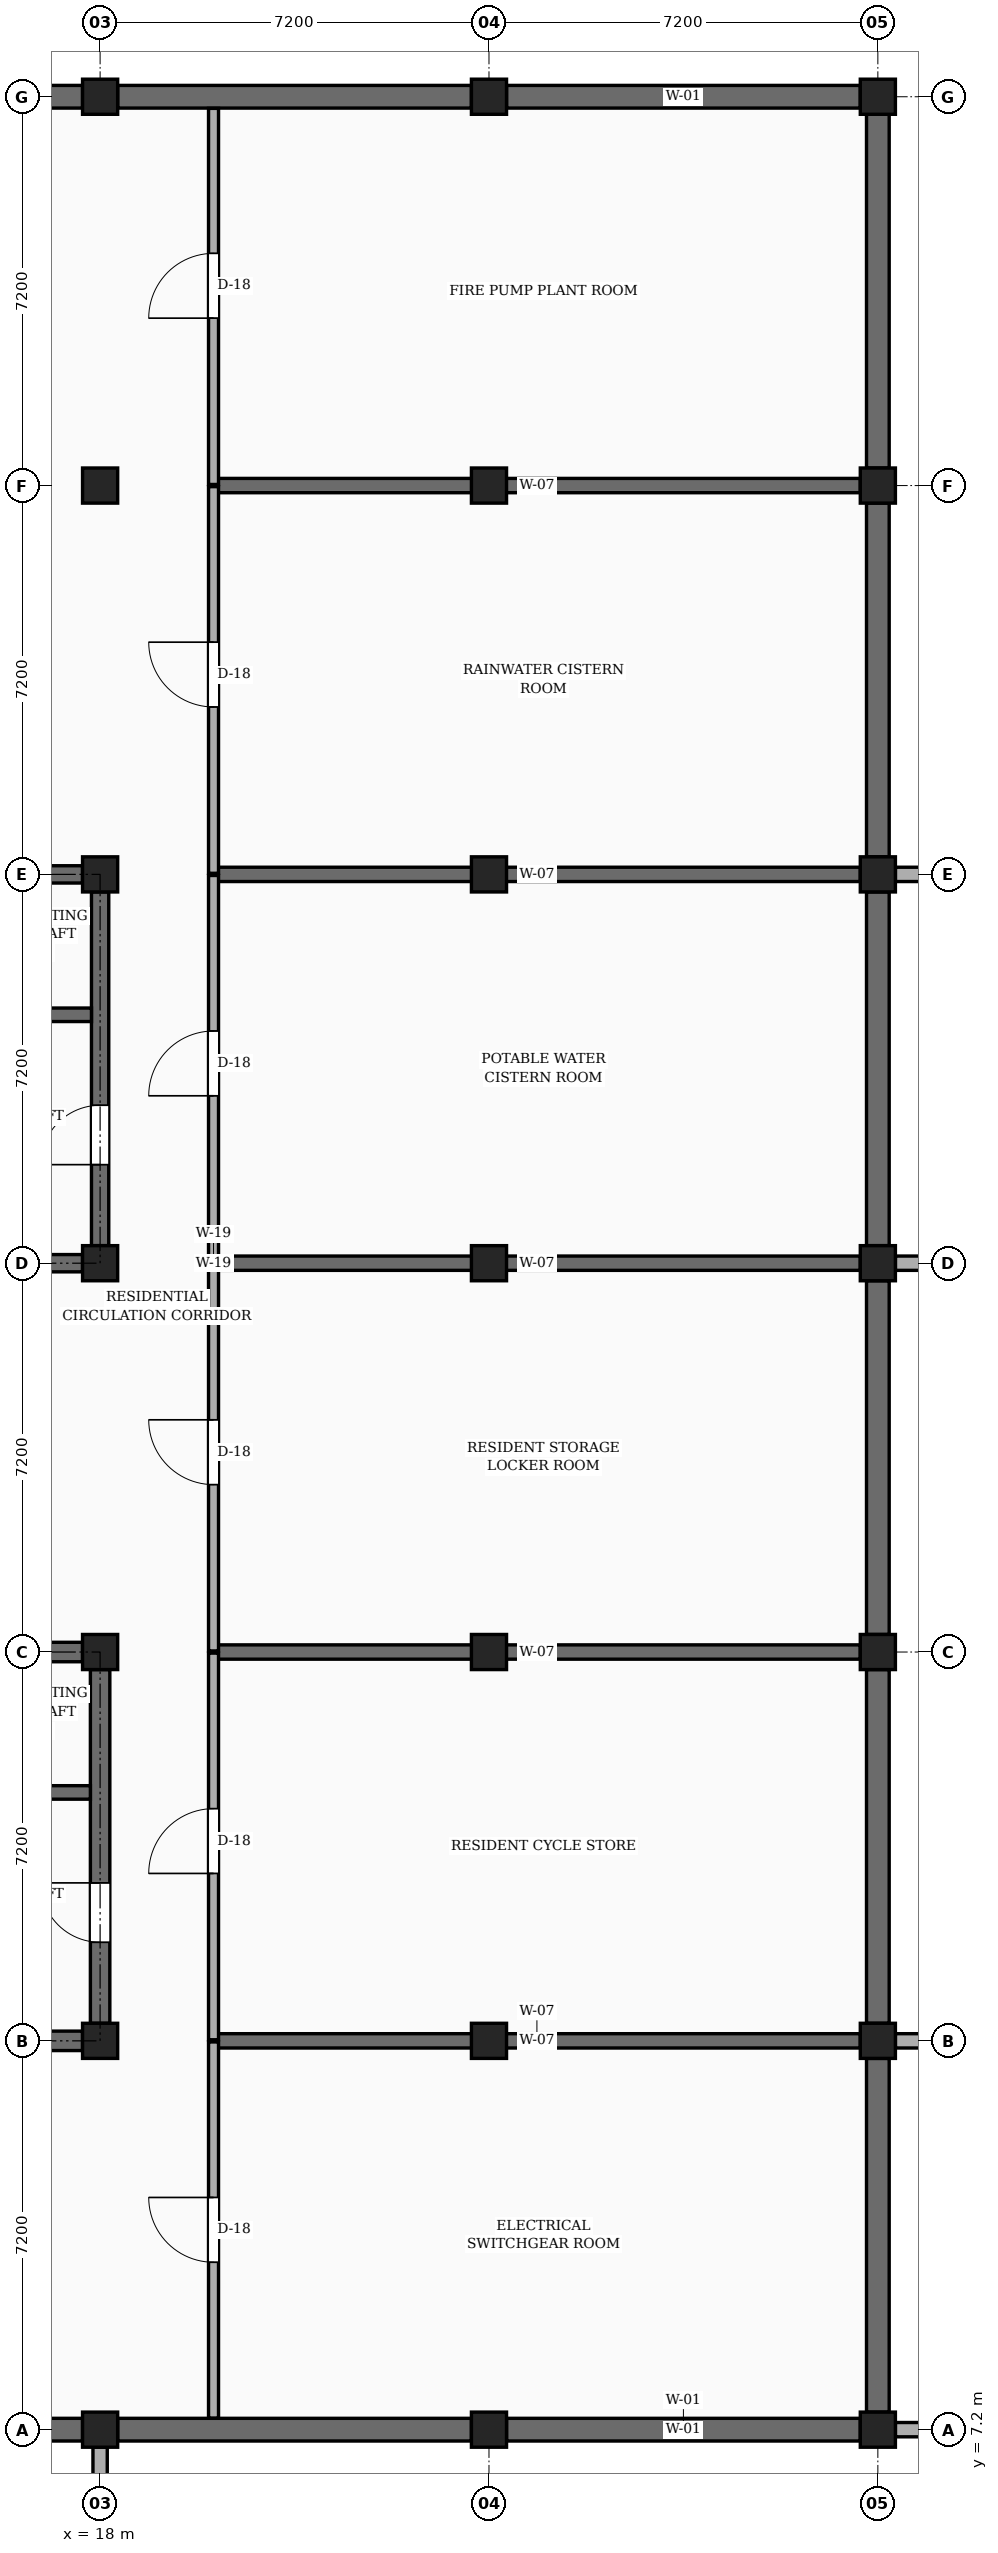
"""IFC4 building model, lengths in metres.
Left out: names, types, materials, properties, quantities, classifications, styles, units other than length and angle.
Written with IfcOpenShell. Run it as: python <this file> out.ifc"""

import sys

from ifc_helpers import new_model, si_unit, direction, frame, frame_2d, origin, origin_2d, place, context, subcontext, project, spatial, rectangle, extrude, element, fill, save


model = new_model("IFC4")
c1 = context("Model", 3, precision=1e-05, world=origin(), true_north=direction((0.0, 1.0)))
c2 = subcontext(c1, "Body", "Model", "MODEL_VIEW")
j1 = project(units=[si_unit("LENGTHUNIT", "METRE"), si_unit("PLANEANGLEUNIT", "RADIAN")], contexts=[c1])
p1 = place(None, origin())
s1 = spatial("IfcSite", under=j1, at=p1, CompositionType="ELEMENT")
p2 = place(p1, origin())
s2 = spatial("IfcBuilding", under=s1, at=p2, CompositionType="ELEMENT")
p3 = place(p2, frame((0.0, 0.0, -4.2)))
s3 = spatial("IfcBuildingStorey", under=s2, at=p3, CompositionType="ELEMENT", Elevation=-4.2)
for number, where, z_axis, x_axis in (
    (1, (18.0, 5.01, 0.0), (0.0, 0.0, 1.0), (0.0, 1.0, 0.0)),
    (2, (32.725, 7.2, 0.0), (0.0, 0.0, 1.0), (1.0, 0.0, 0.0)),
):
    element("IfcWall", number, at=place(p3, frame(where, z_axis=z_axis, x_axis=x_axis)), inside=s3, PredefinedType="SOLIDWALL", context=c2, shape_type="SweptSolid", body=[
        extrude(rectangle(XDim=1.865, YDim=0.265, at=frame_2d((0.933, 0.0))), origin(), (0.0, 0.0, 1.0), 4.12),
    ])
for number, where, z_axis, x_axis in (
    (3, (34.59, 14.4, 0.0), (0.0, 0.0, 1.0), (-1.0, 0.0, 0.0)),
    (4, (32.725, 28.8, 0.0), (0.0, 0.0, 1.0), (1.0, 0.0, 0.0)),
):
    element("IfcWall", number, at=place(p3, frame(where, z_axis=z_axis, x_axis=x_axis)), inside=s3, PredefinedType="SOLIDWALL", context=c2, shape_type="SweptSolid", body=[
        extrude(rectangle(XDim=1.865, YDim=0.265, at=frame_2d((0.933, 0.0))), origin(), (0.0, 0.0, 1.0), 3.35),
    ])
p4 = place(p3, frame((34.59, 36.0, 0.0), z_axis=(0.0, 0.0, 1.0), x_axis=(-1.0, 0.0, 0.0)))
e5 = element("IfcWall", 5, at=p4, inside=s3, PredefinedType="SOLIDWALL", context=c2, shape_type="SweptSolid", body=[
    extrude(rectangle(XDim=1.865, YDim=0.265, at=frame_2d((0.933, 0.0))), origin(), (0.0, 0.0, 1.0), 4.12),
])
for number, where, z_axis, x_axis in (
    (6, (18.0, 7.2, 0.0), (0.0, 0.0, 1.0), (1.0, 0.0, 0.0)),
    (7, (18.0, 14.4, 0.0), (0.0, 0.0, 1.0), (1.0, 0.0, 0.0)),
    (8, (18.0, 21.6, 0.0), (0.0, 0.0, 1.0), (1.0, 0.0, 0.0)),
    (9, (18.0, 28.8, 0.0), (0.0, 0.0, 1.0), (1.0, 0.0, 0.0)),
    (10, (18.0, 36.0, 0.0), (0.0, 0.0, 1.0), (1.0, 0.0, 0.0)),
    (11, (18.0, 43.2, 0.0), (0.0, 0.0, 1.0), (1.0, 0.0, 0.0)),
    (12, (18.0, 50.4, 0.0), (0.0, 0.0, 1.0), (1.0, 0.0, 0.0)),
    (13, (25.2, 7.2, 0.0), (0.0, 0.0, 1.0), (1.0, 0.0, 0.0)),
    (14, (25.2, 14.4, 0.0), (0.0, 0.0, 1.0), (1.0, 0.0, 0.0)),
    (15, (25.2, 21.6, 0.0), (0.0, 0.0, 1.0), (1.0, 0.0, 0.0)),
    (16, (25.2, 28.8, 0.0), (0.0, 0.0, 1.0), (1.0, 0.0, 0.0)),
    (17, (25.2, 36.0, 0.0), (0.0, 0.0, 1.0), (1.0, 0.0, 0.0)),
    (18, (25.2, 43.2, 0.0), (0.0, 0.0, 1.0), (1.0, 0.0, 0.0)),
    (19, (25.2, 50.4, 0.0), (0.0, 0.0, 1.0), (1.0, 0.0, 0.0)),
    (20, (32.4, 7.2, 0.0), (0.0, 0.0, 1.0), (1.0, 0.0, 0.0)),
    (21, (32.4, 14.4, 0.0), (0.0, 0.0, 1.0), (1.0, 0.0, 0.0)),
    (22, (32.4, 21.6, 0.0), (0.0, 0.0, 1.0), (1.0, 0.0, 0.0)),
    (23, (32.4, 28.8, 0.0), (0.0, 0.0, 1.0), (1.0, 0.0, 0.0)),
    (24, (32.4, 36.0, 0.0), (0.0, 0.0, 1.0), (1.0, 0.0, 0.0)),
    (25, (32.4, 43.2, 0.0), (0.0, 0.0, 1.0), (1.0, 0.0, 0.0)),
    (26, (32.4, 50.4, 0.0), (0.0, 0.0, 1.0), (1.0, 0.0, 0.0)),
):
    element("IfcColumn", number, at=place(p3, frame(where, z_axis=z_axis, x_axis=x_axis)), inside=s3, PredefinedType="COLUMN", context=c2, shape_type="SweptSolid", body=[
        extrude(rectangle(XDim=0.65, YDim=0.65, at=origin_2d()), origin(), (0.0, 0.0, 1.0), 4.2),
    ])
for number, where, z_axis, x_axis in (
    (27, (11.125, 7.2, 0.0), (0.0, 0.0, 1.0), (1.0, 0.0, 0.0)),
    (28, (17.675, 50.4, 0.0), (0.0, 0.0, 1.0), (-1.0, 0.0, 0.0)),
    (29, (18.325, 7.2, 0.0), (0.0, 0.0, 1.0), (1.0, 0.0, 0.0)),
    (30, (24.875, 50.4, 0.0), (0.0, 0.0, 1.0), (-1.0, 0.0, 0.0)),
    (31, (25.525, 7.2, 0.0), (0.0, 0.0, 1.0), (1.0, 0.0, 0.0)),
    (32, (32.075, 50.4, 0.0), (0.0, 0.0, 1.0), (-1.0, 0.0, 0.0)),
    (33, (32.4, 7.525, 0.0), (0.0, 0.0, 1.0), (0.0, 1.0, 0.0)),
):
    element("IfcWall", number, at=place(p3, frame(where, z_axis=z_axis, x_axis=x_axis)), inside=s3, PredefinedType="USERDEFINED", context=c2, shape_type="SweptSolid", body=[
        extrude(rectangle(XDim=6.55, YDim=0.42, at=frame_2d((3.275, 0.0))), origin(), (0.0, 0.0, 1.0), 3.03),
    ])
p5 = place(p3, frame((32.4, 14.725, 0.0), z_axis=(0.0, 0.0, 1.0), x_axis=(0.0, 1.0, 0.0)))
e34 = element("IfcWall", 34, at=p5, inside=s3, PredefinedType="USERDEFINED", context=c2, shape_type="SweptSolid", body=[
    extrude(rectangle(XDim=6.55, YDim=0.42, at=frame_2d((3.275, 0.0))), origin(), (0.0, 0.0, 1.0), 3.03),
])
for number, where, z_axis, x_axis in (
    (35, (32.4, 21.925, 0.0), (0.0, 0.0, 1.0), (0.0, 1.0, 0.0)),
    (36, (32.4, 29.125, 0.0), (0.0, 0.0, 1.0), (0.0, 1.0, 0.0)),
    (37, (32.4, 36.325, 0.0), (0.0, 0.0, 1.0), (0.0, 1.0, 0.0)),
    (38, (32.4, 43.525, 0.0), (0.0, 0.0, 1.0), (0.0, 1.0, 0.0)),
):
    element("IfcWall", number, at=place(p3, frame(where, z_axis=z_axis, x_axis=x_axis)), inside=s3, PredefinedType="USERDEFINED", context=c2, shape_type="SweptSolid", body=[
        extrude(rectangle(XDim=6.55, YDim=0.42, at=frame_2d((3.275, 0.0))), origin(), (0.0, 0.0, 1.0), 3.03),
    ])
for number, where, z_axis, x_axis in (
    (39, (20.1, 14.4, 0.0), (0.0, 0.0, 1.0), (1.0, 0.0, 0.0)),
    (40, (20.1, 21.6, 0.0), (0.0, 0.0, 1.0), (1.0, 0.0, 0.0)),
    (41, (20.1, 28.8, 0.0), (0.0, 0.0, 1.0), (1.0, 0.0, 0.0)),
    (42, (20.1, 36.0, 0.0), (0.0, 0.0, 1.0), (1.0, 0.0, 0.0)),
    (43, (20.1, 43.2, 0.0), (0.0, 0.0, 1.0), (1.0, 0.0, 0.0)),
):
    element("IfcWall", number, at=place(p3, frame(where, z_axis=z_axis, x_axis=x_axis)), inside=s3, PredefinedType="SOLIDWALL", context=c2, shape_type="SweptSolid", body=[
        extrude(rectangle(XDim=11.975, YDim=0.265, at=frame_2d((5.987, 0.0))), origin(), (0.0, 0.0, 1.0), 3.18),
    ])
p6 = place(p3, frame((11.125, 21.6, 0.0), z_axis=(0.0, 0.0, 1.0), x_axis=(1.0, 0.0, 0.0)))
e44 = element("IfcWall", 44, at=p6, inside=s3, PredefinedType="SHEAR", context=c2, shape_type="SweptSolid", body=[
    extrude(rectangle(XDim=6.55, YDim=0.36, at=frame_2d((3.275, 0.0))), origin(), (0.0, 0.0, 1.0), 3.88),
])
p7 = place(p3, frame((18.0, 14.725, 0.0), z_axis=(0.0, 0.0, 1.0), x_axis=(0.0, 1.0, 0.0)))
e45 = element("IfcWall", 45, at=p7, inside=s3, PredefinedType="SHEAR", context=c2, shape_type="SweptSolid", body=[
    extrude(rectangle(XDim=6.55, YDim=0.36, at=frame_2d((3.275, 0.0))), origin(), (0.0, 0.0, 1.0), 3.88),
])
p8 = place(p7, frame((1.5, 0.0, 0.0)))
e46 = element("IfcOpeningElement", 46, at=p8, cuts=e45, PredefinedType="OPENING", context=c2, shape_type="SweptSolid", body=[
    extrude(rectangle(XDim=1.1, YDim=2.15, at=frame_2d((0.55, 1.075))), frame((0.0, 0.19, 0.0), z_axis=(0.0, -1.0, 0.0), x_axis=(1.0, 0.0, 0.0)), (0.0, 0.0, 1.0), 0.38),
])
p9 = place(p3, frame((11.125, 14.4, 0.0), z_axis=(0.0, 0.0, 1.0), x_axis=(1.0, 0.0, 0.0)))
e47 = element("IfcWall", 47, at=p9, inside=s3, PredefinedType="SHEAR", context=c2, shape_type="SweptSolid", body=[
    extrude(rectangle(XDim=6.55, YDim=0.36, at=frame_2d((3.275, 0.0))), origin(), (0.0, 0.0, 1.0), 3.88),
])
p10 = place(p9, frame((4.425, 0.0, 0.0)))
e48 = element("IfcOpeningElement", 48, at=p10, cuts=e47, PredefinedType="OPENING", context=c2, shape_type="SweptSolid", body=[
    extrude(rectangle(XDim=1.1, YDim=2.15, at=frame_2d((0.55, 1.075))), frame((0.0, 0.19, 0.0), z_axis=(0.0, -1.0, 0.0), x_axis=(1.0, 0.0, 0.0)), (0.0, 0.0, 1.0), 0.38),
])
p11 = place(p3, frame((14.525, 19.0, 0.0), z_axis=(0.0, 0.0, 1.0), x_axis=(1.0, 0.0, 0.0)))
e49 = element("IfcWall", 49, at=p11, inside=s3, PredefinedType="SHEAR", context=c2, shape_type="SweptSolid", body=[
    extrude(rectangle(XDim=3.295, YDim=0.25, at=frame_2d((1.647, 0.0))), origin(), (0.0, 0.0, 1.0), 3.88),
])
p12 = place(p11, frame((1.1, 0.0, 0.0)))
e50 = element("IfcOpeningElement", 50, at=p12, cuts=e49, PredefinedType="OPENING", context=c2, shape_type="SweptSolid", body=[
    extrude(rectangle(XDim=1.1, YDim=2.2, at=frame_2d((0.55, 1.1))), frame((0.0, 0.135, 0.0), z_axis=(0.0, -1.0, 0.0), x_axis=(1.0, 0.0, 0.0)), (0.0, 0.0, 1.0), 0.27),
])
p13 = place(p3, frame((11.125, 36.0, 0.0), z_axis=(0.0, 0.0, 1.0), x_axis=(1.0, 0.0, 0.0)))
e51 = element("IfcWall", 51, at=p13, inside=s3, PredefinedType="SHEAR", context=c2, shape_type="SweptSolid", body=[
    extrude(rectangle(XDim=6.55, YDim=0.32, at=frame_2d((3.275, 0.0))), origin(), (0.0, 0.0, 1.0), 3.88),
])
p14 = place(p3, frame((18.0, 29.125, 0.0), z_axis=(0.0, 0.0, 1.0), x_axis=(0.0, 1.0, 0.0)))
e52 = element("IfcWall", 52, at=p14, inside=s3, PredefinedType="SHEAR", context=c2, shape_type="SweptSolid", body=[
    extrude(rectangle(XDim=6.55, YDim=0.32, at=frame_2d((3.275, 0.0))), origin(), (0.0, 0.0, 1.0), 3.88),
])
p15 = place(p14, frame((1.5, 0.0, 0.0)))
e53 = element("IfcOpeningElement", 53, at=p15, cuts=e52, PredefinedType="OPENING", context=c2, shape_type="SweptSolid", body=[
    extrude(rectangle(XDim=1.1, YDim=2.15, at=frame_2d((0.55, 1.075))), frame((0.0, 0.17, 0.0), z_axis=(0.0, -1.0, 0.0), x_axis=(1.0, 0.0, 0.0)), (0.0, 0.0, 1.0), 0.34),
])
p16 = place(p3, frame((11.125, 28.8, 0.0), z_axis=(0.0, 0.0, 1.0), x_axis=(1.0, 0.0, 0.0)))
e54 = element("IfcWall", 54, at=p16, inside=s3, PredefinedType="SHEAR", context=c2, shape_type="SweptSolid", body=[
    extrude(rectangle(XDim=6.55, YDim=0.32, at=frame_2d((3.275, 0.0))), origin(), (0.0, 0.0, 1.0), 3.88),
])
p17 = place(p16, frame((4.425, 0.0, 0.0)))
e55 = element("IfcOpeningElement", 55, at=p17, cuts=e54, PredefinedType="OPENING", context=c2, shape_type="SweptSolid", body=[
    extrude(rectangle(XDim=1.1, YDim=2.15, at=frame_2d((0.55, 1.075))), frame((0.0, 0.17, 0.0), z_axis=(0.0, -1.0, 0.0), x_axis=(1.0, 0.0, 0.0)), (0.0, 0.0, 1.0), 0.34),
])
p18 = place(p3, frame((14.525, 33.4, 0.0), z_axis=(0.0, 0.0, 1.0), x_axis=(1.0, 0.0, 0.0)))
e56 = element("IfcWall", 56, at=p18, inside=s3, PredefinedType="SHEAR", context=c2, shape_type="SweptSolid", body=[
    extrude(rectangle(XDim=3.315, YDim=0.25, at=frame_2d((1.658, 0.0))), origin(), (0.0, 0.0, 1.0), 3.88),
])
p19 = place(p18, frame((1.1, 0.0, 0.0)))
e57 = element("IfcOpeningElement", 57, at=p19, cuts=e56, PredefinedType="OPENING", context=c2, shape_type="SweptSolid", body=[
    extrude(rectangle(XDim=1.1, YDim=2.2, at=frame_2d((0.55, 1.1))), frame((0.0, 0.135, 0.0), z_axis=(0.0, -1.0, 0.0), x_axis=(1.0, 0.0, 0.0)), (0.0, 0.0, 1.0), 0.27),
])
p20 = place(p3, frame((20.1, 7.415, 0.0), z_axis=(0.0, 0.0, 1.0), x_axis=(0.0, 1.0, 0.0)))
e58 = element("IfcWall", 58, at=p20, inside=s3, PredefinedType="PARTITIONING", context=c2, shape_type="SweptSolid", body=[
    extrude(rectangle(XDim=6.965, YDim=0.185, at=frame_2d((3.482, 0.0))), origin(), (0.0, 0.0, 1.0), 3.315),
])
p21 = place(p20, frame((2.885, 0.0, 0.0)))
e59 = element("IfcOpeningElement", 59, at=p21, cuts=e58, PredefinedType="OPENING", context=c2, shape_type="SweptSolid", body=[
    extrude(rectangle(XDim=1.2, YDim=2.2, at=frame_2d((0.6, 1.1))), frame((0.0, 0.103, 0.0), z_axis=(0.0, -1.0, 0.0), x_axis=(1.0, 0.0, 0.0)), (0.0, 0.0, 1.0), 0.205),
])
p22 = place(p3, frame((20.1, 14.42, 0.0), z_axis=(0.0, 0.0, 1.0), x_axis=(0.0, 1.0, 0.0)))
e60 = element("IfcWall", 60, at=p22, inside=s3, PredefinedType="PARTITIONING", context=c2, shape_type="SweptSolid", body=[
    extrude(rectangle(XDim=7.16, YDim=0.185, at=frame_2d((3.58, 0.0))), origin(), (0.0, 0.0, 1.0), 3.315),
])
p23 = place(p22, frame((3.08, 0.0, 0.0)))
e61 = element("IfcOpeningElement", 61, at=p23, cuts=e60, PredefinedType="OPENING", context=c2, shape_type="SweptSolid", body=[
    extrude(rectangle(XDim=1.2, YDim=2.2, at=frame_2d((0.6, 1.1))), frame((0.0, 0.103, 0.0), z_axis=(0.0, -1.0, 0.0), x_axis=(1.0, 0.0, 0.0)), (0.0, 0.0, 1.0), 0.205),
])
p24 = place(p3, frame((20.1, 21.62, 0.0), z_axis=(0.0, 0.0, 1.0), x_axis=(0.0, 1.0, 0.0)))
e62 = element("IfcWall", 62, at=p24, inside=s3, PredefinedType="PARTITIONING", context=c2, shape_type="SweptSolid", body=[
    extrude(rectangle(XDim=7.16, YDim=0.185, at=frame_2d((3.58, 0.0))), origin(), (0.0, 0.0, 1.0), 3.315),
])
p25 = place(p24, frame((3.08, 0.0, 0.0)))
e63 = element("IfcOpeningElement", 63, at=p25, cuts=e62, PredefinedType="OPENING", context=c2, shape_type="SweptSolid", body=[
    extrude(rectangle(XDim=1.2, YDim=2.2, at=frame_2d((0.6, 1.1))), frame((0.0, 0.103, 0.0), z_axis=(0.0, -1.0, 0.0), x_axis=(1.0, 0.0, 0.0)), (0.0, 0.0, 1.0), 0.205),
])
p26 = place(p3, frame((20.1, 28.82, 0.0), z_axis=(0.0, 0.0, 1.0), x_axis=(0.0, 1.0, 0.0)))
e64 = element("IfcWall", 64, at=p26, inside=s3, PredefinedType="PARTITIONING", context=c2, shape_type="SweptSolid", body=[
    extrude(rectangle(XDim=7.16, YDim=0.185, at=frame_2d((3.58, 0.0))), origin(), (0.0, 0.0, 1.0), 3.315),
])
p27 = place(p26, frame((3.08, 0.0, 0.0)))
e65 = element("IfcOpeningElement", 65, at=p27, cuts=e64, PredefinedType="OPENING", context=c2, shape_type="SweptSolid", body=[
    extrude(rectangle(XDim=1.2, YDim=2.2, at=frame_2d((0.6, 1.1))), frame((0.0, 0.103, 0.0), z_axis=(0.0, -1.0, 0.0), x_axis=(1.0, 0.0, 0.0)), (0.0, 0.0, 1.0), 0.205),
])
p28 = place(p3, frame((20.1, 36.02, 0.0), z_axis=(0.0, 0.0, 1.0), x_axis=(0.0, 1.0, 0.0)))
e66 = element("IfcWall", 66, at=p28, inside=s3, PredefinedType="PARTITIONING", context=c2, shape_type="SweptSolid", body=[
    extrude(rectangle(XDim=7.16, YDim=0.185, at=frame_2d((3.58, 0.0))), origin(), (0.0, 0.0, 1.0), 3.315),
])
p29 = place(p28, frame((3.08, 0.0, 0.0)))
e67 = element("IfcOpeningElement", 67, at=p29, cuts=e66, PredefinedType="OPENING", context=c2, shape_type="SweptSolid", body=[
    extrude(rectangle(XDim=1.2, YDim=2.2, at=frame_2d((0.6, 1.1))), frame((0.0, 0.103, 0.0), z_axis=(0.0, -1.0, 0.0), x_axis=(1.0, 0.0, 0.0)), (0.0, 0.0, 1.0), 0.205),
])
p30 = place(p3, frame((20.1, 43.22, 0.0), z_axis=(0.0, 0.0, 1.0), x_axis=(0.0, 1.0, 0.0)))
e68 = element("IfcWall", 68, at=p30, inside=s3, PredefinedType="PARTITIONING", context=c2, shape_type="SweptSolid", body=[
    extrude(rectangle(XDim=6.965, YDim=0.185, at=frame_2d((3.482, 0.0))), origin(), (0.0, 0.0, 1.0), 3.315),
])
p31 = place(p30, frame((3.08, 0.0, 0.0)))
e69 = element("IfcOpeningElement", 69, at=p31, cuts=e68, PredefinedType="OPENING", context=c2, shape_type="SweptSolid", body=[
    extrude(rectangle(XDim=1.2, YDim=2.2, at=frame_2d((0.6, 1.1))), frame((0.0, 0.103, 0.0), z_axis=(0.0, -1.0, 0.0), x_axis=(1.0, 0.0, 0.0)), (0.0, 0.0, 1.0), 0.205),
])
p32 = place(p8, frame((1.1, 0.0, 0.0), z_axis=(0.0, 0.0, 1.0), x_axis=(-1.0, 0.0, 0.0)))
e70 = element("IfcDoor", 70, at=p32, inside=s3, OperationType="SINGLE_SWING_RIGHT", PredefinedType="DOOR", context=c2, shape_type="SweptSolid", body=[
    extrude(rectangle(XDim=1.1, YDim=2.15, at=frame_2d((0.55, 1.075))), frame((0.0, 0.025, 0.0), z_axis=(0.0, -1.0, 0.0), x_axis=(1.0, 0.0, 0.0)), (0.0, 0.0, 1.0), 0.05),
])
fill(e46, e70)
p33 = place(p15, frame((1.1, 0.0, 0.0), z_axis=(0.0, 0.0, 1.0), x_axis=(-1.0, 0.0, 0.0)))
e71 = element("IfcDoor", 71, at=p33, inside=s3, OperationType="SINGLE_SWING_LEFT", PredefinedType="DOOR", context=c2, shape_type="SweptSolid", body=[
    extrude(rectangle(XDim=1.1, YDim=2.15, at=frame_2d((0.55, 1.075))), frame((0.0, 0.025, 0.0), z_axis=(0.0, -1.0, 0.0), x_axis=(1.0, 0.0, 0.0)), (0.0, 0.0, 1.0), 0.05),
])
fill(e53, e71)
p34 = place(p21, origin())
e72 = element("IfcDoor", 72, at=p34, inside=s3, OperationType="SINGLE_SWING_RIGHT", PredefinedType="DOOR", context=c2, shape_type="SweptSolid", body=[
    extrude(rectangle(XDim=1.2, YDim=2.2, at=frame_2d((0.6, 1.1))), frame((0.0, 0.025, 0.0), z_axis=(0.0, -1.0, 0.0), x_axis=(1.0, 0.0, 0.0)), (0.0, 0.0, 1.0), 0.05),
])
fill(e59, e72)
p35 = place(p23, origin())
e73 = element("IfcDoor", 73, at=p35, inside=s3, OperationType="SINGLE_SWING_LEFT", PredefinedType="DOOR", context=c2, shape_type="SweptSolid", body=[
    extrude(rectangle(XDim=1.2, YDim=2.2, at=frame_2d((0.6, 1.1))), frame((0.0, 0.025, 0.0), z_axis=(0.0, -1.0, 0.0), x_axis=(1.0, 0.0, 0.0)), (0.0, 0.0, 1.0), 0.05),
])
fill(e61, e73)
p36 = place(p25, origin())
e74 = element("IfcDoor", 74, at=p36, inside=s3, OperationType="SINGLE_SWING_RIGHT", PredefinedType="DOOR", context=c2, shape_type="SweptSolid", body=[
    extrude(rectangle(XDim=1.2, YDim=2.2, at=frame_2d((0.6, 1.1))), frame((0.0, 0.025, 0.0), z_axis=(0.0, -1.0, 0.0), x_axis=(1.0, 0.0, 0.0)), (0.0, 0.0, 1.0), 0.05),
])
fill(e63, e74)
p37 = place(p27, origin())
e75 = element("IfcDoor", 75, at=p37, inside=s3, OperationType="SINGLE_SWING_LEFT", PredefinedType="DOOR", context=c2, shape_type="SweptSolid", body=[
    extrude(rectangle(XDim=1.2, YDim=2.2, at=frame_2d((0.6, 1.1))), frame((0.0, 0.025, 0.0), z_axis=(0.0, -1.0, 0.0), x_axis=(1.0, 0.0, 0.0)), (0.0, 0.0, 1.0), 0.05),
])
fill(e65, e75)
p38 = place(p29, origin())
e76 = element("IfcDoor", 76, at=p38, inside=s3, OperationType="SINGLE_SWING_RIGHT", PredefinedType="DOOR", context=c2, shape_type="SweptSolid", body=[
    extrude(rectangle(XDim=1.2, YDim=2.2, at=frame_2d((0.6, 1.1))), frame((0.0, 0.025, 0.0), z_axis=(0.0, -1.0, 0.0), x_axis=(1.0, 0.0, 0.0)), (0.0, 0.0, 1.0), 0.05),
])
fill(e67, e76)
p39 = place(p31, origin())
e77 = element("IfcDoor", 77, at=p39, inside=s3, OperationType="SINGLE_SWING_LEFT", PredefinedType="DOOR", context=c2, shape_type="SweptSolid", body=[
    extrude(rectangle(XDim=1.2, YDim=2.2, at=frame_2d((0.6, 1.1))), frame((0.0, 0.025, 0.0), z_axis=(0.0, -1.0, 0.0), x_axis=(1.0, 0.0, 0.0)), (0.0, 0.0, 1.0), 0.05),
])
fill(e69, e77)
save(model, sys.argv[1])
